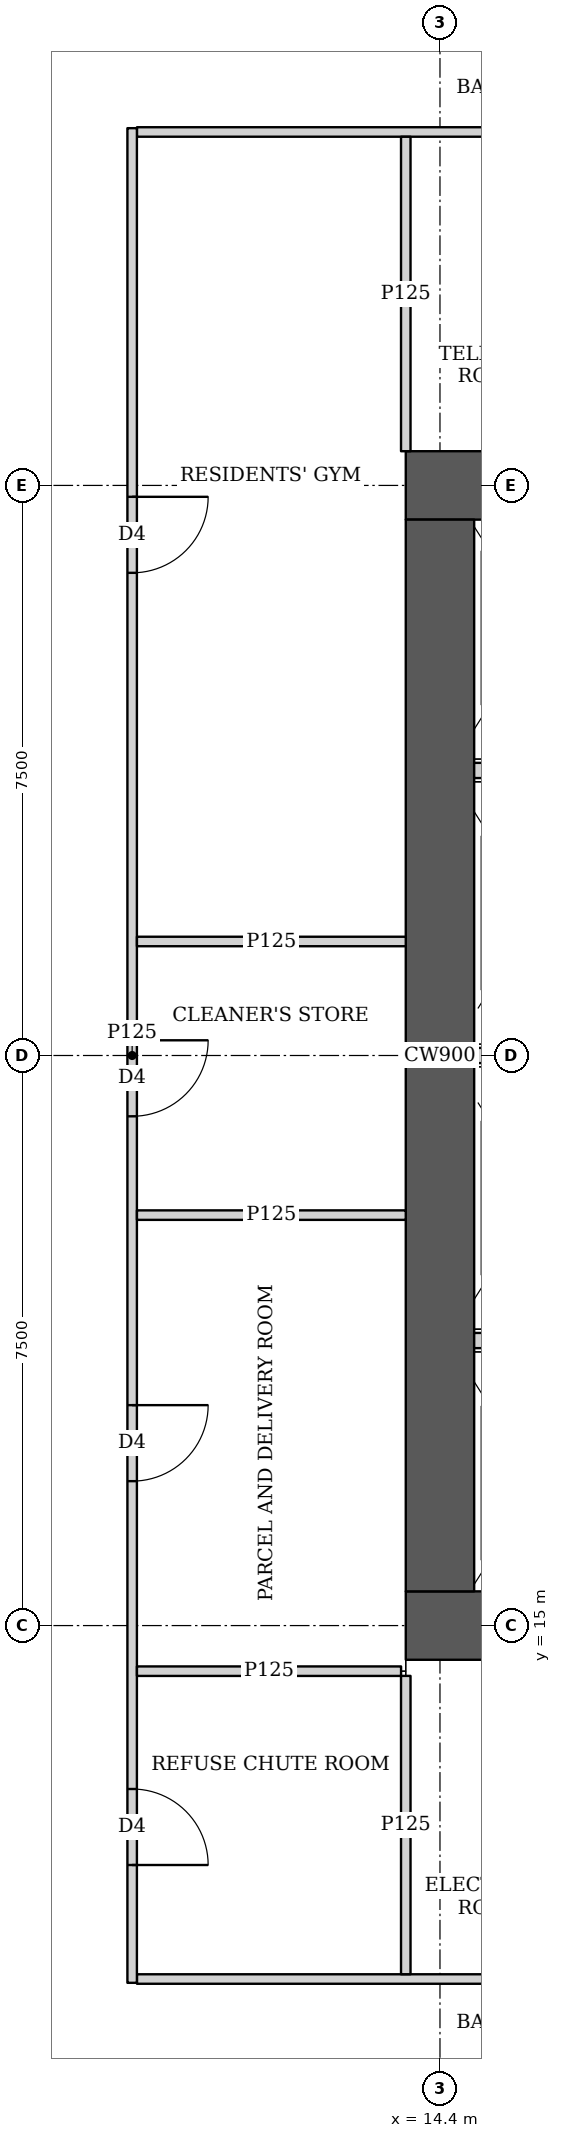
"""IFC4 building model, lengths in metres.
Left out: names, types, materials, properties, quantities, classifications, styles, units other than length and angle.
Written with IfcOpenShell. Run it as: python <this file> out.ifc"""

import sys

from ifc_helpers import new_model, si_unit, direction, frame, frame_2d, origin, place, context, subcontext, project, spatial, rectangle, extrude, element, fill, save


model = new_model("IFC4")
c1 = context("Model", 3, precision=1e-05, world=origin(), true_north=direction((0.0, 1.0)))
c2 = subcontext(c1, "Body", "Model", "MODEL_VIEW")
j1 = project(units=[si_unit("LENGTHUNIT", "METRE"), si_unit("PLANEANGLEUNIT", "RADIAN")], contexts=[c1])
p1 = place(None, origin())
s1 = spatial("IfcSite", under=j1, at=p1, CompositionType="ELEMENT")
p2 = place(p1, origin())
s2 = spatial("IfcBuilding", under=s1, at=p2, CompositionType="ELEMENT")
p3 = place(p2, frame((0.0, 0.0, 89.15)))
s3 = spatial("IfcBuildingStorey", under=s2, at=p3, CompositionType="ELEMENT", Elevation=89.15)
p4 = place(p3, frame((13.95, 15.0, 0.0), z_axis=(0.0, 0.0, 1.0), x_axis=(1.0, 0.0, 0.0)))
e1 = element("IfcWall", 1, at=p4, inside=s3, PredefinedType="SHEAR", context=c2, shape_type="SweptSolid", body=[
    extrude(rectangle(XDim=15.3, YDim=0.9, at=frame_2d((7.65, 0.0))), origin(), (0.0, 0.0, 1.0), 3.75),
])
p5 = place(p4, frame((4.45, 0.0, 0.0)))
e2 = element("IfcOpeningElement", 2, at=p5, cuts=e1, PredefinedType="OPENING", context=c2, shape_type="SweptSolid", body=[
    extrude(rectangle(XDim=1.8, YDim=2.1, at=frame_2d((0.9, 1.05))), frame((0.0, 0.46, 0.0), z_axis=(0.0, -1.0, 0.0), x_axis=(1.0, 0.0, 0.0)), (0.0, 0.0, 1.0), 0.92),
])
p6 = place(p4, frame((10.7, 0.0, 0.0)))
e3 = element("IfcOpeningElement", 3, at=p6, cuts=e1, PredefinedType="OPENING", context=c2, shape_type="SweptSolid", body=[
    extrude(rectangle(XDim=1.1, YDim=2.1, at=frame_2d((0.55, 1.05))), frame((0.0, 0.46, 0.0), z_axis=(0.0, -1.0, 0.0), x_axis=(1.0, 0.0, 0.0)), (0.0, 0.0, 1.0), 0.92),
])
p7 = place(p3, frame((13.95, 30.0, 0.0), z_axis=(0.0, 0.0, 1.0), x_axis=(1.0, 0.0, 0.0)))
e4 = element("IfcWall", 4, at=p7, inside=s3, PredefinedType="SHEAR", context=c2, shape_type="SweptSolid", body=[
    extrude(rectangle(XDim=15.3, YDim=0.9, at=frame_2d((7.65, 0.0))), origin(), (0.0, 0.0, 1.0), 3.75),
])
p8 = place(p7, frame((4.45, 0.0, 0.0)))
e5 = element("IfcOpeningElement", 5, at=p8, cuts=e4, PredefinedType="OPENING", context=c2, shape_type="SweptSolid", body=[
    extrude(rectangle(XDim=1.8, YDim=2.1, at=frame_2d((0.9, 1.05))), frame((0.0, 0.46, 0.0), z_axis=(0.0, -1.0, 0.0), x_axis=(1.0, 0.0, 0.0)), (0.0, 0.0, 1.0), 0.92),
])
p9 = place(p7, frame((10.7, 0.0, 0.0)))
e6 = element("IfcOpeningElement", 6, at=p9, cuts=e4, PredefinedType="OPENING", context=c2, shape_type="SweptSolid", body=[
    extrude(rectangle(XDim=1.1, YDim=2.1, at=frame_2d((0.55, 1.05))), frame((0.0, 0.46, 0.0), z_axis=(0.0, -1.0, 0.0), x_axis=(1.0, 0.0, 0.0)), (0.0, 0.0, 1.0), 0.92),
])
p10 = place(p3, frame((14.4, 15.45, 0.0), z_axis=(0.0, 0.0, 1.0), x_axis=(0.0, 1.0, 0.0)))
e7 = element("IfcWall", 7, at=p10, inside=s3, PredefinedType="SHEAR", context=c2, shape_type="SweptSolid", body=[
    extrude(rectangle(XDim=14.1, YDim=0.9, at=frame_2d((7.05, 0.0))), origin(), (0.0, 0.0, 1.0), 3.75),
])
p11 = place(p3, frame((10.35, 10.3, 0.0), z_axis=(0.0, 0.0, 1.0), x_axis=(0.0, 1.0, 0.0)))
e8 = element("IfcWall", 8, at=p11, inside=s3, PredefinedType="PARTITIONING", context=c2, shape_type="SweptSolid", body=[
    extrude(rectangle(XDim=24.4, YDim=0.125, at=frame_2d((12.2, 0.0))), origin(), (0.0, 0.0, 1.0), 3.5),
])
p12 = place(p11, frame((1.55, 0.0, 0.0)))
e9 = element("IfcOpeningElement", 9, at=p12, cuts=e8, PredefinedType="OPENING", context=c2, shape_type="SweptSolid", body=[
    extrude(rectangle(XDim=1.0, YDim=2.1, at=frame_2d((0.5, 1.05))), frame((0.0, 0.073, 0.0), z_axis=(0.0, -1.0, 0.0), x_axis=(1.0, 0.0, 0.0)), (0.0, 0.0, 1.0), 0.145),
])
p13 = place(p11, frame((6.6, 0.0, 0.0)))
e10 = element("IfcOpeningElement", 10, at=p13, cuts=e8, PredefinedType="OPENING", context=c2, shape_type="SweptSolid", body=[
    extrude(rectangle(XDim=1.0, YDim=2.1, at=frame_2d((0.5, 1.05))), frame((0.0, 0.073, 0.0), z_axis=(0.0, -1.0, 0.0), x_axis=(1.0, 0.0, 0.0)), (0.0, 0.0, 1.0), 0.145),
])
p14 = place(p11, frame((11.4, 0.0, 0.0)))
e11 = element("IfcOpeningElement", 11, at=p14, cuts=e8, PredefinedType="OPENING", context=c2, shape_type="SweptSolid", body=[
    extrude(rectangle(XDim=1.0, YDim=2.1, at=frame_2d((0.5, 1.05))), frame((0.0, 0.073, 0.0), z_axis=(0.0, -1.0, 0.0), x_axis=(1.0, 0.0, 0.0)), (0.0, 0.0, 1.0), 0.145),
])
p15 = place(p11, frame((18.55, 0.0, 0.0)))
e12 = element("IfcOpeningElement", 12, at=p15, cuts=e8, PredefinedType="OPENING", context=c2, shape_type="SweptSolid", body=[
    extrude(rectangle(XDim=1.0, YDim=2.1, at=frame_2d((0.5, 1.05))), frame((0.0, 0.073, 0.0), z_axis=(0.0, -1.0, 0.0), x_axis=(1.0, 0.0, 0.0)), (0.0, 0.0, 1.0), 0.145),
])
p16 = place(p3, frame((10.413, 14.4, 0.0), z_axis=(0.0, 0.0, 1.0), x_axis=(1.0, 0.0, 0.0)))
e13 = element("IfcWall", 13, at=p16, inside=s3, PredefinedType="PARTITIONING", context=c2, shape_type="SweptSolid", body=[
    extrude(rectangle(XDim=3.475, YDim=0.125, at=frame_2d((1.737, 0.0))), origin(), (0.0, 0.0, 1.0), 3.5),
])
for number, where, z_axis, x_axis in (
    (14, (10.413, 20.4, 0.0), (0.0, 0.0, 1.0), (1.0, 0.0, 0.0)),
    (15, (10.413, 24.0, 0.0), (0.0, 0.0, 1.0), (1.0, 0.0, 0.0)),
):
    element("IfcWall", number, at=place(p3, frame(where, z_axis=z_axis, x_axis=x_axis)), inside=s3, PredefinedType="PARTITIONING", context=c2, shape_type="SweptSolid", body=[
        extrude(rectangle(XDim=3.537, YDim=0.125, at=frame_2d((1.769, 0.0))), origin(), (0.0, 0.0, 1.0), 3.5),
    ])
p17 = place(p3, frame((13.95, 10.413, 0.0), z_axis=(0.0, 0.0, 1.0), x_axis=(0.0, 1.0, 0.0)))
e16 = element("IfcWall", 16, at=p17, inside=s3, PredefinedType="PARTITIONING", context=c2, shape_type="SweptSolid", body=[
    extrude(rectangle(XDim=3.925, YDim=0.125, at=frame_2d((1.962, 0.0))), origin(), (0.0, 0.0, 1.0), 3.5),
])
p18 = place(p3, frame((13.95, 30.45, 0.0), z_axis=(0.0, 0.0, 1.0), x_axis=(0.0, 1.0, 0.0)))
e17 = element("IfcWall", 17, at=p18, inside=s3, PredefinedType="PARTITIONING", context=c2, shape_type="SweptSolid", body=[
    extrude(rectangle(XDim=4.137, YDim=0.125, at=frame_2d((2.068, 0.0))), origin(), (0.0, 0.0, 1.0), 3.5),
])
p19 = place(p3, frame((10.413, 10.35, 0.0), z_axis=(0.0, 0.0, 1.0), x_axis=(1.0, 0.0, 0.0)))
e18 = element("IfcWall", 18, at=p19, inside=s3, PredefinedType="PARTITIONING", context=c2, shape_type="SweptSolid", body=[
    extrude(rectangle(XDim=10.837, YDim=0.125, at=frame_2d((5.418, 0.0))), origin(), (0.0, 0.0, 1.0), 3.5),
])
p20 = place(p19, frame((7.582, 0.0, 0.0)))
e19 = element("IfcOpeningElement", 19, at=p20, cuts=e18, PredefinedType="OPENING", context=c2, shape_type="SweptSolid", body=[
    extrude(rectangle(XDim=1.8, YDim=2.1, at=frame_2d((0.9, 1.05))), frame((0.0, 0.073, 0.0), z_axis=(0.0, -1.0, 0.0), x_axis=(1.0, 0.0, 0.0)), (0.0, 0.0, 1.0), 0.145),
])
p21 = place(p3, frame((10.413, 34.65, 0.0), z_axis=(0.0, 0.0, 1.0), x_axis=(1.0, 0.0, 0.0)))
e20 = element("IfcWall", 20, at=p21, inside=s3, PredefinedType="PARTITIONING", context=c2, shape_type="SweptSolid", body=[
    extrude(rectangle(XDim=10.837, YDim=0.125, at=frame_2d((5.418, 0.0))), origin(), (0.0, 0.0, 1.0), 3.5),
])
p22 = place(p21, frame((7.487, 0.0, 0.0)))
e21 = element("IfcOpeningElement", 21, at=p22, cuts=e20, PredefinedType="OPENING", context=c2, shape_type="SweptSolid", body=[
    extrude(rectangle(XDim=1.8, YDim=2.1, at=frame_2d((0.9, 1.05))), frame((0.0, 0.073, 0.0), z_axis=(0.0, -1.0, 0.0), x_axis=(1.0, 0.0, 0.0)), (0.0, 0.0, 1.0), 0.145),
])
for number, where, z_axis, x_axis in (
    (22, (14.85, 18.75, 0.0), (0.0, 0.0, 1.0), (1.0, 0.0, 0.0)),
    (23, (14.85, 22.5, 0.0), (0.0, 0.0, 1.0), (1.0, 0.0, 0.0)),
    (24, (14.85, 26.25, 0.0), (0.0, 0.0, 1.0), (1.0, 0.0, 0.0)),
):
    element("IfcWall", number, at=place(p3, frame(where, z_axis=z_axis, x_axis=x_axis)), inside=s3, PredefinedType="SOLIDWALL", context=c2, shape_type="SweptSolid", body=[
        extrude(rectangle(XDim=1.95, YDim=0.2, at=frame_2d((0.975, 0.0))), origin(), (0.0, 0.0, 1.0), 3.5),
    ])
p23 = place(p12, origin())
e25 = element("IfcDoor", 25, at=p23, inside=s3, OperationType="SINGLE_SWING_RIGHT", PredefinedType="DOOR", context=c2, shape_type="SweptSolid", body=[
    extrude(rectangle(XDim=1.0, YDim=2.1, at=frame_2d((0.5, 1.05))), frame((0.0, 0.025, 0.0), z_axis=(0.0, -1.0, 0.0), x_axis=(1.0, 0.0, 0.0)), (0.0, 0.0, 1.0), 0.05),
])
fill(e9, e25)
p24 = place(p13, origin())
e26 = element("IfcDoor", 26, at=p24, inside=s3, OperationType="SINGLE_SWING_LEFT", PredefinedType="DOOR", context=c2, shape_type="SweptSolid", body=[
    extrude(rectangle(XDim=1.0, YDim=2.1, at=frame_2d((0.5, 1.05))), frame((0.0, 0.025, 0.0), z_axis=(0.0, -1.0, 0.0), x_axis=(1.0, 0.0, 0.0)), (0.0, 0.0, 1.0), 0.05),
])
fill(e10, e26)
p25 = place(p14, origin())
e27 = element("IfcDoor", 27, at=p25, inside=s3, OperationType="SINGLE_SWING_LEFT", PredefinedType="DOOR", context=c2, shape_type="SweptSolid", body=[
    extrude(rectangle(XDim=1.0, YDim=2.1, at=frame_2d((0.5, 1.05))), frame((0.0, 0.025, 0.0), z_axis=(0.0, -1.0, 0.0), x_axis=(1.0, 0.0, 0.0)), (0.0, 0.0, 1.0), 0.05),
])
fill(e11, e27)
p26 = place(p15, origin())
e28 = element("IfcDoor", 28, at=p26, inside=s3, OperationType="SINGLE_SWING_LEFT", PredefinedType="DOOR", context=c2, shape_type="SweptSolid", body=[
    extrude(rectangle(XDim=1.0, YDim=2.1, at=frame_2d((0.5, 1.05))), frame((0.0, 0.025, 0.0), z_axis=(0.0, -1.0, 0.0), x_axis=(1.0, 0.0, 0.0)), (0.0, 0.0, 1.0), 0.05),
])
fill(e12, e28)
save(model, sys.argv[1])
